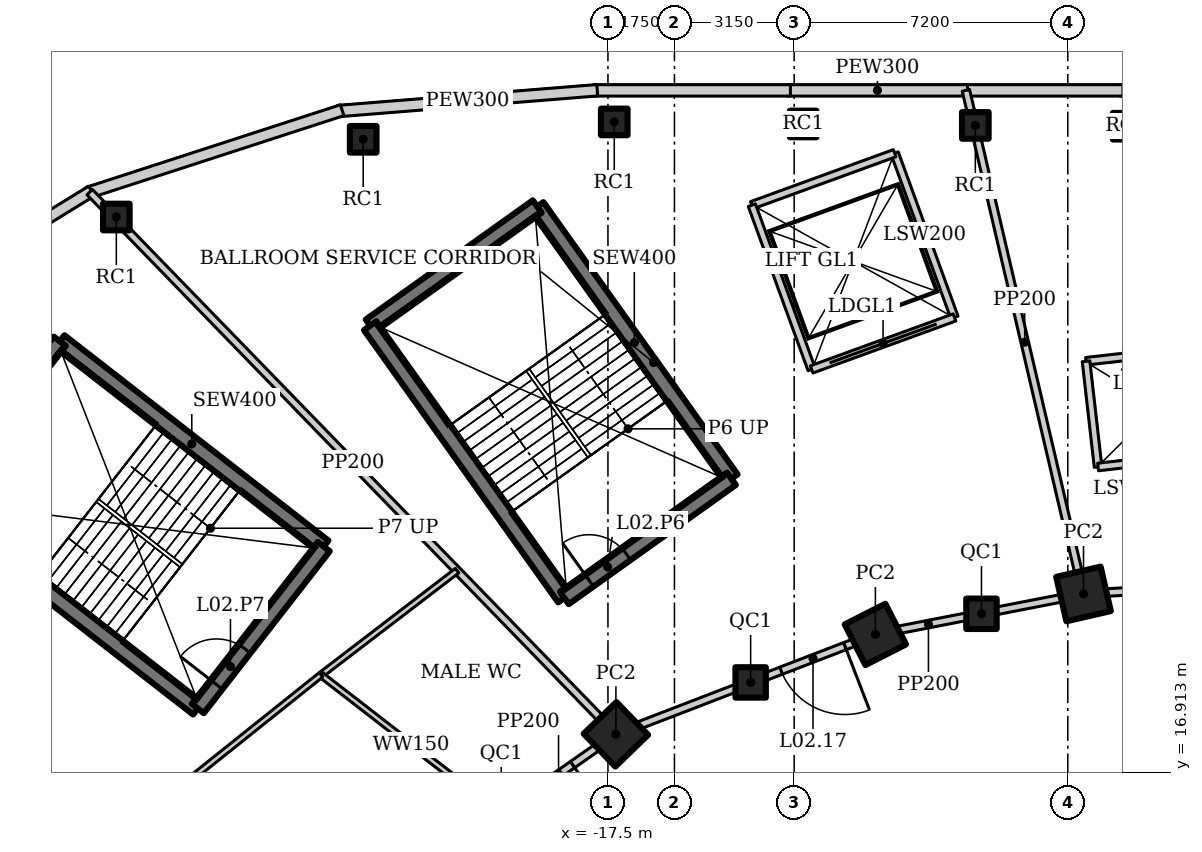
"""IFC4 building model, lengths in metres.
Left out: names, types, materials, properties, quantities, classifications, styles, units other than length and angle.
Written with IfcOpenShell. Run it as: python <this file> out.ifc"""

import sys

from ifc_helpers import new_model, si_unit, direction, frame, frame_2d, origin, origin_2d, place, context, subcontext, project, spatial, rectangle, hollow_rectangle, extrude, element, fill, save


model = new_model("IFC4")
c1 = context("Model", 3, precision=1e-05, world=origin(), true_north=direction((0.0, 1.0)))
c2 = subcontext(c1, "Body", "Model", "MODEL_VIEW")
j1 = project(units=[si_unit("LENGTHUNIT", "METRE"), si_unit("PLANEANGLEUNIT", "RADIAN")], contexts=[c1])
p1 = place(None, origin())
s1 = spatial("IfcSite", under=j1, at=p1, CompositionType="ELEMENT")
p2 = place(p1, origin())
s2 = spatial("IfcBuilding", under=s1, at=p2, CompositionType="ELEMENT")
p3 = place(p2, frame((0.0, 0.0, 14.5)))
s3 = spatial("IfcBuildingStorey", under=s2, at=p3, CompositionType="ELEMENT", Elevation=14.5)
for number, where, z_axis, x_axis in (
    (1, (-4.986, 21.598, 0.0), (0.0, 0.0, 1.0), (0.974, 0.225, 0.0)),
    (2, (-10.463, 20.534, 0.0), (0.0, 0.0, 1.0), (0.891, 0.454, 0.0)),
    (3, (-17.291, 17.905, 0.0), (0.0, 0.0, 1.0), (0.719, 0.695, 0.0)),
):
    element("IfcColumn", number, at=place(p3, frame(where, z_axis=z_axis, x_axis=x_axis)), inside=s3, PredefinedType="COLUMN", context=c2, shape_type="SweptSolid", body=[
        extrude(hollow_rectangle(XDim=1.2, YDim=1.2, WallThickness=0.1, at=origin_2d()), origin(), (0.0, 0.0, 1.0), 7.5),
    ])
for number, where, z_axis, x_axis in (
    (4, (-7.671, 21.076, 0.0), (0.0, 0.0, 1.0), (1.0, 0.0, 0.0)),
    (5, (-13.745, 19.27, 0.0), (0.0, 0.0, 1.0), (1.0, 0.0, 0.0)),
):
    element("IfcColumn", number, at=place(p3, frame(where, z_axis=z_axis, x_axis=x_axis)), inside=s3, PredefinedType="COLUMN", context=c2, shape_type="SweptSolid", body=[
        extrude(hollow_rectangle(XDim=0.8, YDim=0.8, WallThickness=0.05, at=origin_2d()), origin(), (0.0, 0.0, 1.0), 7.5),
    ])
for number, where, z_axis, x_axis in (
    (6, (-3.863, 33.907, 0.0), (0.0, 0.0, 1.0), (1.0, 0.0, 0.0)),
    (7, (-12.363, 33.966, 0.0), (0.0, 0.0, 1.0), (1.0, 0.0, 0.0)),
    (8, (-23.94, 33.563, 0.0), (0.0, 0.0, 1.0), (1.0, 0.0, 0.0)),
    (9, (-7.833, 33.928, 0.0), (0.0, 0.0, 1.0), (1.0, 0.0, 0.0)),
    (10, (-17.334, 34.02, 0.0), (0.0, 0.0, 1.0), (1.0, 0.0, 0.0)),
    (11, (-30.436, 31.518, 0.0), (0.0, 0.0, 1.0), (1.0, 0.0, 0.0)),
):
    element("IfcColumn", number, at=place(p3, frame(where, z_axis=z_axis, x_axis=x_axis)), inside=s3, PredefinedType="COLUMN", context=c2, shape_type="SweptSolid", body=[
        extrude(hollow_rectangle(XDim=0.7, YDim=0.7, WallThickness=0.04, at=origin_2d()), origin(), (0.0, 0.0, 1.0), 7.5),
    ])
p4 = place(p3, frame((0.04, 34.85, 0.0), z_axis=(0.0, 0.0, 1.0), x_axis=(-1.0, 0.0, 0.0)))
e12 = element("IfcWall", 12, at=p4, inside=s3, PredefinedType="SOLIDWALL", context=c2, shape_type="SweptSolid", body=[
    extrude(rectangle(XDim=4.068, YDim=0.3, at=frame_2d((2.034, 0.0))), origin(), (0.0, 0.0, 1.0), 7.3),
])
p5 = place(p3, frame((-3.948, 34.85, 0.0), z_axis=(0.0, 0.0, 1.0), x_axis=(-1.0, 0.0, 0.0)))
e13 = element("IfcWall", 13, at=p5, inside=s3, PredefinedType="SOLIDWALL", context=c2, shape_type="SweptSolid", body=[
    extrude(rectangle(XDim=4.173, YDim=0.3, at=frame_2d((2.086, 0.0))), origin(), (0.0, 0.0, 1.0), 7.3),
])
p6 = place(p3, frame((-8.04, 34.85, 0.0), z_axis=(0.0, 0.0, 1.0), x_axis=(-1.0, 0.0, 0.0)))
e14 = element("IfcWall", 14, at=p6, inside=s3, PredefinedType="SOLIDWALL", context=c2, shape_type="SweptSolid", body=[
    extrude(rectangle(XDim=4.739, YDim=0.3, at=frame_2d((2.369, 0.0))), origin(), (0.0, 0.0, 1.0), 7.3),
])
p7 = place(p3, frame((-12.699, 34.85, 0.0), z_axis=(0.0, 0.0, 1.0), x_axis=(-1.0, 0.0, 0.0)))
e15 = element("IfcWall", 15, at=p7, inside=s3, PredefinedType="SOLIDWALL", context=c2, shape_type="SweptSolid", body=[
    extrude(rectangle(XDim=5.174, YDim=0.3, at=frame_2d((2.587, 0.0))), origin(), (0.0, 0.0, 1.0), 7.3),
])
p8 = place(p3, frame((-17.781, 34.854, 0.0), z_axis=(0.0, 0.0, 1.0), x_axis=(-0.996791084449, -0.080047073422, 0.0)))
e16 = element("IfcWall", 16, at=p8, inside=s3, PredefinedType="SOLIDWALL", context=c2, shape_type="SweptSolid", body=[
    extrude(rectangle(XDim=6.847, YDim=0.3, at=frame_2d((3.424, 0.0))), origin(), (0.0, 0.0, 1.0), 7.3),
])
p9 = place(p3, frame((-24.495, 34.328, 0.0), z_axis=(0.0, 0.0, 1.0), x_axis=(-0.951140010357, -0.308759907853, 0.0)))
e17 = element("IfcWall", 17, at=p9, inside=s3, PredefinedType="SOLIDWALL", context=c2, shape_type="SweptSolid", body=[
    extrude(rectangle(XDim=7.041, YDim=0.3, at=frame_2d((3.521, 0.0))), origin(), (0.0, 0.0, 1.0), 7.3),
])
p10 = place(p3, frame((-31.088, 32.202, 0.0), z_axis=(0.0, 0.0, 1.0), x_axis=(-0.851808565246, -0.52385319334, 0.0)))
e18 = element("IfcWall", 18, at=p10, inside=s3, PredefinedType="SOLIDWALL", context=c2, shape_type="SweptSolid", body=[
    extrude(rectangle(XDim=6.861, YDim=0.3, at=frame_2d((3.43, 0.0))), origin(), (0.0, 0.0, 1.0), 7.3),
])
p11 = place(p3, frame((-2.478, 21.75, 0.0), z_axis=(0.0, 0.0, 1.0), x_axis=(-0.998172405641, -0.060430527186, 0.0)))
e19 = element("IfcWall", 19, at=p11, inside=s3, PredefinedType="SOLIDWALL", context=c2, shape_type="SweptSolid", body=[
    extrude(rectangle(XDim=2.513, YDim=0.2, at=frame_2d((1.256, 0.0))), origin(), (0.0, 0.0, 1.0), 6.764),
])
p12 = place(p3, frame((-4.986, 21.598, 0.0), z_axis=(0.0, 0.0, 1.0), x_axis=(-0.981637218105, -0.190757364289, 0.0)))
e20 = element("IfcWall", 20, at=p12, inside=s3, PredefinedType="SOLIDWALL", context=c2, shape_type="SweptSolid", body=[
    extrude(rectangle(XDim=2.735, YDim=0.2, at=frame_2d((1.368, 0.0))), origin(), (0.0, 0.0, 1.0), 6.607),
])
p13 = place(p3, frame((-7.671, 21.076, 0.0), z_axis=(0.0, 0.0, 1.0), x_axis=(-0.98163593748, -0.190763954266, 0.0)))
e21 = element("IfcWall", 21, at=p13, inside=s3, PredefinedType="SOLIDWALL", context=c2, shape_type="SweptSolid", body=[
    extrude(rectangle(XDim=2.844, YDim=0.2, at=frame_2d((1.422, 0.0))), origin(), (0.0, 0.0, 1.0), 6.838),
])
p14 = place(p3, frame((-10.463, 20.534, 0.0), z_axis=(0.0, 0.0, 1.0), x_axis=(-0.933241815012, -0.359248820058, 0.0)))
e22 = element("IfcWall", 22, at=p14, inside=s3, PredefinedType="SOLIDWALL", context=c2, shape_type="SweptSolid", body=[
    extrude(rectangle(XDim=3.518, YDim=0.2, at=frame_2d((1.759, 0.0))), origin(), (0.0, 0.0, 1.0), 6.896),
])
p15 = place(p14, frame((0.859, 0.0, 0.0)))
e23 = element("IfcOpeningElement", 23, at=p15, cuts=e22, PredefinedType="OPENING", context=c2, shape_type="SweptSolid", body=[
    extrude(rectangle(XDim=1.8, YDim=2.4, at=frame_2d((0.9, 1.2))), frame((0.0, 0.11, 0.0), z_axis=(0.0, -1.0, 0.0), x_axis=(1.0, 0.0, 0.0)), (0.0, 0.0, 1.0), 0.22),
])
p16 = place(p3, frame((-13.745, 19.27, 0.0), z_axis=(0.0, 0.0, 1.0), x_axis=(-0.933224646415, -0.359293416754, 0.0)))
e24 = element("IfcWall", 24, at=p16, inside=s3, PredefinedType="SOLIDWALL", context=c2, shape_type="SweptSolid", body=[
    extrude(rectangle(XDim=3.799, YDim=0.2, at=frame_2d((1.899, 0.0))), origin(), (0.0, 0.0, 1.0), 6.764),
])
p17 = place(p3, frame((-17.291, 17.905, 0.0), z_axis=(0.0, 0.0, 1.0), x_axis=(-0.819409395821, -0.573208724672, 0.0)))
e25 = element("IfcWall", 25, at=p17, inside=s3, PredefinedType="SOLIDWALL", context=c2, shape_type="SweptSolid", body=[
    extrude(rectangle(XDim=3.683, YDim=0.2, at=frame_2d((1.841, 0.0))), origin(), (0.0, 0.0, 1.0), 6.896),
])
p18 = place(p17, frame((1.391, 0.0, 0.0)))
e26 = element("IfcOpeningElement", 26, at=p18, cuts=e25, PredefinedType="OPENING", context=c2, shape_type="SweptSolid", body=[
    extrude(rectangle(XDim=0.9, YDim=2.1, at=frame_2d((0.45, 1.05))), frame((0.0, 0.11, 0.0), z_axis=(0.0, -1.0, 0.0), x_axis=(1.0, 0.0, 0.0)), (0.0, 0.0, 1.0), 0.22),
])
p19 = place(p3, frame((-4.986, 21.598, 0.0), z_axis=(0.0, 0.0, 1.0), x_axis=(-0.227360055616, 0.973810764528, 0.0)))
e27 = element("IfcWall", 27, at=p19, inside=s3, PredefinedType="SOLIDWALL", context=c2, shape_type="SweptSolid", body=[
    extrude(rectangle(XDim=13.608, YDim=0.2, at=frame_2d((6.804, 0.0))), origin(), (0.0, 0.0, 1.0), 6.528),
])
p20 = place(p3, frame((-17.291, 17.905, 0.0), z_axis=(0.0, 0.0, 1.0), x_axis=(-0.696460684513, 0.717594951855, 0.0)))
e28 = element("IfcWall", 28, at=p20, inside=s3, PredefinedType="SOLIDWALL", context=c2, shape_type="SweptSolid", body=[
    extrude(rectangle(XDim=19.881, YDim=0.2, at=frame_2d((9.94, 0.0))), origin(), (0.0, 0.0, 1.0), 5.8),
])
p21 = place(p3, frame((-21.469, 22.211, 0.0), z_axis=(0.0, 0.0, 1.0), x_axis=(-0.794122703503, -0.607757461313, 0.0)))
e29 = element("IfcWall", 29, at=p21, inside=s3, PredefinedType="SOLIDWALL", context=c2, shape_type="SweptSolid", body=[
    extrude(rectangle(XDim=4.51, YDim=0.15, at=frame_2d((2.255, 0.0))), origin(), (0.0, 0.0, 1.0), 7.3),
])
p22 = place(p3, frame((-20.309, 15.794, 0.0), z_axis=(0.0, 0.0, 1.0), x_axis=(-0.790437708207, 0.61254243073, 0.0)))
e30 = element("IfcWall", 30, at=p22, inside=s3, PredefinedType="SOLIDWALL", context=c2, shape_type="SweptSolid", body=[
    extrude(rectangle(XDim=6.0, YDim=0.15, at=frame_2d((3.0, 0.0))), origin(), (0.0, 0.0, 1.0), 7.3),
])
p23 = place(p3, frame((-25.051, 19.469, 0.0), z_axis=(0.0, 0.0, 1.0), x_axis=(-0.781204641684, -0.624275025779, 0.0)))
e31 = element("IfcWall", 31, at=p23, inside=s3, PredefinedType="SOLIDWALL", context=c2, shape_type="SweptSolid", body=[
    extrude(rectangle(XDim=4.821, YDim=0.15, at=frame_2d((2.411, 0.0))), origin(), (0.0, 0.0, 1.0), 7.3),
])
p24 = place(p3, frame((-14.251, 24.629, 0.0), z_axis=(0.0, 0.0, 1.0), x_axis=(-0.580705313356, 0.814113836659, 0.0)))
e32 = element("IfcWall", 32, at=p24, inside=s3, PredefinedType="SHEAR", context=c2, shape_type="SweptSolid", body=[
    extrude(rectangle(XDim=8.8, YDim=0.4, at=frame_2d((4.4, 0.0))), origin(), (0.0, 0.0, 1.0), 7.5),
])
p25 = place(p3, frame((-19.361, 31.793, 0.0), z_axis=(0.0, 0.0, 1.0), x_axis=(-0.814121252423, -0.580694916762, 0.0)))
e33 = element("IfcWall", 33, at=p25, inside=s3, PredefinedType="SHEAR", context=c2, shape_type="SweptSolid", body=[
    extrude(rectangle(XDim=5.4, YDim=0.4, at=frame_2d((2.7, 0.0))), origin(), (0.0, 0.0, 1.0), 7.5),
])
p26 = place(p3, frame((-23.757, 28.657, 0.0), z_axis=(0.0, 0.0, 1.0), x_axis=(0.580705313356, -0.814113836659, 0.0)))
e34 = element("IfcWall", 34, at=p26, inside=s3, PredefinedType="SHEAR", context=c2, shape_type="SweptSolid", body=[
    extrude(rectangle(XDim=8.8, YDim=0.4, at=frame_2d((4.4, 0.0))), origin(), (0.0, 0.0, 1.0), 7.5),
])
p27 = place(p3, frame((-18.647, 21.493, 0.0), z_axis=(0.0, 0.0, 1.0), x_axis=(0.814121252423, 0.580694916762, 0.0)))
e35 = element("IfcWall", 35, at=p27, inside=s3, PredefinedType="SHEAR", context=c2, shape_type="SweptSolid", body=[
    extrude(rectangle(XDim=5.4, YDim=0.4, at=frame_2d((2.7, 0.0))), origin(), (0.0, 0.0, 1.0), 7.5),
])
p28 = place(p27, frame((0.8, 0.0, 0.0)))
e36 = element("IfcOpeningElement", 36, at=p28, cuts=e35, PredefinedType="OPENING", context=c2, shape_type="SweptSolid", body=[
    extrude(rectangle(XDim=1.2, YDim=2.1, at=frame_2d((0.6, 1.05))), frame((0.0, 0.21, 0.0), z_axis=(0.0, -1.0, 0.0), x_axis=(1.0, 0.0, 0.0)), (0.0, 0.0, 1.0), 0.42),
])
p29 = place(p3, frame((-24.978, 22.846, 0.0), z_axis=(0.0, 0.0, 1.0), x_axis=(-0.78938060008, 0.613904119726, 0.0)))
e37 = element("IfcWall", 37, at=p29, inside=s3, PredefinedType="SHEAR", context=c2, shape_type="SweptSolid", body=[
    extrude(rectangle(XDim=8.8, YDim=0.4, at=frame_2d((4.4, 0.0))), origin(), (0.0, 0.0, 1.0), 7.5),
])
p30 = place(p3, frame((-31.924, 28.248, 0.0), z_axis=(0.0, 0.0, 1.0), x_axis=(-0.613912443548, -0.789374126544, 0.0)))
e38 = element("IfcWall", 38, at=p30, inside=s3, PredefinedType="SHEAR", context=c2, shape_type="SweptSolid", body=[
    extrude(rectangle(XDim=5.4, YDim=0.4, at=frame_2d((2.7, 0.0))), origin(), (0.0, 0.0, 1.0), 7.5),
])
p31 = place(p3, frame((-35.239, 23.985, 0.0), z_axis=(0.0, 0.0, 1.0), x_axis=(0.78938060008, -0.613904119726, 0.0)))
e39 = element("IfcWall", 39, at=p31, inside=s3, PredefinedType="SHEAR", context=c2, shape_type="SweptSolid", body=[
    extrude(rectangle(XDim=8.8, YDim=0.4, at=frame_2d((4.4, 0.0))), origin(), (0.0, 0.0, 1.0), 7.5),
])
p32 = place(p3, frame((-28.293, 18.583, 0.0), z_axis=(0.0, 0.0, 1.0), x_axis=(0.613912443548, 0.789374126544, 0.0)))
e40 = element("IfcWall", 40, at=p32, inside=s3, PredefinedType="SHEAR", context=c2, shape_type="SweptSolid", body=[
    extrude(rectangle(XDim=5.4, YDim=0.4, at=frame_2d((2.7, 0.0))), origin(), (0.0, 0.0, 1.0), 7.5),
])
p33 = place(p32, frame((0.8, 0.0, 0.0)))
e41 = element("IfcOpeningElement", 41, at=p33, cuts=e40, PredefinedType="OPENING", context=c2, shape_type="SweptSolid", body=[
    extrude(rectangle(XDim=1.2, YDim=2.1, at=frame_2d((0.6, 1.05))), frame((0.0, 0.21, 0.0), z_axis=(0.0, -1.0, 0.0), x_axis=(1.0, 0.0, 0.0)), (0.0, 0.0, 1.0), 0.42),
])
p34 = place(p3, frame((-1.442, 28.117, 0.0), z_axis=(0.0, 0.0, 1.0), x_axis=(-0.993571061716, -0.113210182053, 0.0)))
e42 = element("IfcWall", 42, at=p34, inside=s3, PredefinedType="SOLIDWALL", context=c2, shape_type="SweptSolid", body=[
    extrude(rectangle(XDim=3.5, YDim=0.2, at=frame_2d((1.75, 0.0))), origin(), (0.0, 0.0, 1.0), 7.3),
])
p35 = place(p3, frame((-4.92, 27.721, 0.0), z_axis=(0.0, 0.0, 1.0), x_axis=(0.113177712989, -0.993574760792, 0.0)))
e43 = element("IfcWall", 43, at=p35, inside=s3, PredefinedType="SOLIDWALL", context=c2, shape_type="SweptSolid", body=[
    extrude(rectangle(XDim=2.8, YDim=0.2, at=frame_2d((1.4, 0.0))), origin(), (0.0, 0.0, 1.0), 7.3),
])
p36 = place(p3, frame((-4.603, 24.939, 0.0), z_axis=(0.0, 0.0, 1.0), x_axis=(0.993571061716, 0.113210182053, 0.0)))
e44 = element("IfcWall", 44, at=p36, inside=s3, PredefinedType="SOLIDWALL", context=c2, shape_type="SweptSolid", body=[
    extrude(rectangle(XDim=3.5, YDim=0.2, at=frame_2d((1.75, 0.0))), origin(), (0.0, 0.0, 1.0), 7.3),
])
p37 = place(p36, frame((1.2, 0.0, 0.0)))
e45 = element("IfcOpeningElement", 45, at=p37, cuts=e44, PredefinedType="OPENING", context=c2, shape_type="SweptSolid", body=[
    extrude(rectangle(XDim=1.1, YDim=2.2, at=frame_2d((0.55, 1.1))), frame((0.0, 0.11, 0.0), z_axis=(0.0, -1.0, 0.0), x_axis=(1.0, 0.0, 0.0)), (0.0, 0.0, 1.0), 0.22),
])
p38 = place(p3, frame((-8.381, 28.875, 0.0), z_axis=(0.0, 0.0, 1.0), x_axis=(-0.342045591466, 0.93968335803, 0.0)))
e46 = element("IfcWall", 46, at=p38, inside=s3, PredefinedType="SOLIDWALL", context=c2, shape_type="SweptSolid", body=[
    extrude(rectangle(XDim=4.6, YDim=0.2, at=frame_2d((2.3, 0.0))), origin(), (0.0, 0.0, 1.0), 7.3),
])
p39 = place(p3, frame((-9.955, 33.198, 0.0), z_axis=(0.0, 0.0, 1.0), x_axis=(-0.939686455819, -0.342037080957, 0.0)))
e47 = element("IfcWall", 47, at=p39, inside=s3, PredefinedType="SOLIDWALL", context=c2, shape_type="SweptSolid", body=[
    extrude(rectangle(XDim=4.0, YDim=0.2, at=frame_2d((2.0, 0.0))), origin(), (0.0, 0.0, 1.0), 7.3),
])
p40 = place(p3, frame((-13.713, 31.829, 0.0), z_axis=(0.0, 0.0, 1.0), x_axis=(0.342062650202, -0.939677148459, 0.0)))
e48 = element("IfcWall", 48, at=p40, inside=s3, PredefinedType="SOLIDWALL", context=c2, shape_type="SweptSolid", body=[
    extrude(rectangle(XDim=4.6, YDim=0.2, at=frame_2d((2.3, 0.0))), origin(), (0.0, 0.0, 1.0), 7.3),
])
p41 = place(p3, frame((-12.14, 27.507, 0.0), z_axis=(0.0, 0.0, 1.0), x_axis=(0.939706071622, 0.341983185197, 0.0)))
e49 = element("IfcWall", 49, at=p41, inside=s3, PredefinedType="SOLIDWALL", context=c2, shape_type="SweptSolid", body=[
    extrude(rectangle(XDim=4.0, YDim=0.2, at=frame_2d((2.0, 0.0))), origin(), (0.0, 0.0, 1.0), 7.3),
])
p42 = place(p41, frame((0.5, 0.0, 0.0)))
e50 = element("IfcOpeningElement", 50, at=p42, cuts=e49, PredefinedType="OPENING", context=c2, shape_type="SweptSolid", body=[
    extrude(rectangle(XDim=3.0, YDim=3.0, at=frame_2d((1.5, 1.5))), frame((0.0, 0.11, 0.0), z_axis=(0.0, -1.0, 0.0), x_axis=(1.0, 0.0, 0.0)), (0.0, 0.0, 1.0), 0.22),
])
p43 = place(p15, origin())
e51 = element("IfcDoor", 51, at=p43, inside=s3, OperationType="DOUBLE_DOOR_DOUBLE_SWING", PredefinedType="DOOR", context=c2, shape_type="SweptSolid", body=[
    extrude(rectangle(XDim=1.8, YDim=2.4, at=frame_2d((0.9, 1.2))), frame((0.0, 0.025, 0.0), z_axis=(0.0, -1.0, 0.0), x_axis=(1.0, 0.0, 0.0)), (0.0, 0.0, 1.0), 0.05),
])
fill(e23, e51)
p44 = place(p18, origin())
e52 = element("IfcDoor", 52, at=p44, inside=s3, OperationType="SINGLE_SWING_LEFT", PredefinedType="DOOR", context=c2, shape_type="SweptSolid", body=[
    extrude(rectangle(XDim=0.9, YDim=2.1, at=frame_2d((0.45, 1.05))), frame((0.0, 0.025, 0.0), z_axis=(0.0, -1.0, 0.0), x_axis=(1.0, 0.0, 0.0)), (0.0, 0.0, 1.0), 0.05),
])
fill(e26, e52)
p45 = place(p28, origin())
e53 = element("IfcDoor", 53, at=p45, inside=s3, OperationType="SINGLE_SWING_RIGHT", PredefinedType="DOOR", context=c2, shape_type="SweptSolid", body=[
    extrude(rectangle(XDim=1.2, YDim=2.1, at=frame_2d((0.6, 1.05))), frame((0.0, 0.025, 0.0), z_axis=(0.0, -1.0, 0.0), x_axis=(1.0, 0.0, 0.0)), (0.0, 0.0, 1.0), 0.05),
])
fill(e36, e53)
p46 = place(p33, origin())
e54 = element("IfcDoor", 54, at=p46, inside=s3, OperationType="SINGLE_SWING_RIGHT", PredefinedType="DOOR", context=c2, shape_type="SweptSolid", body=[
    extrude(rectangle(XDim=1.2, YDim=2.1, at=frame_2d((0.6, 1.05))), frame((0.0, 0.025, 0.0), z_axis=(0.0, -1.0, 0.0), x_axis=(1.0, 0.0, 0.0)), (0.0, 0.0, 1.0), 0.05),
])
fill(e41, e54)
p47 = place(p42, origin())
e55 = element("IfcDoor", 55, at=p47, inside=s3, OperationType="DOUBLE_DOOR_SLIDING", PredefinedType="DOOR", context=c2, shape_type="SweptSolid", body=[
    extrude(rectangle(XDim=3.0, YDim=3.0, at=frame_2d((1.5, 1.5))), frame((0.0, 0.025, 0.0), z_axis=(0.0, -1.0, 0.0), x_axis=(1.0, 0.0, 0.0)), (0.0, 0.0, 1.0), 0.05),
])
fill(e50, e55)
save(model, sys.argv[1])
